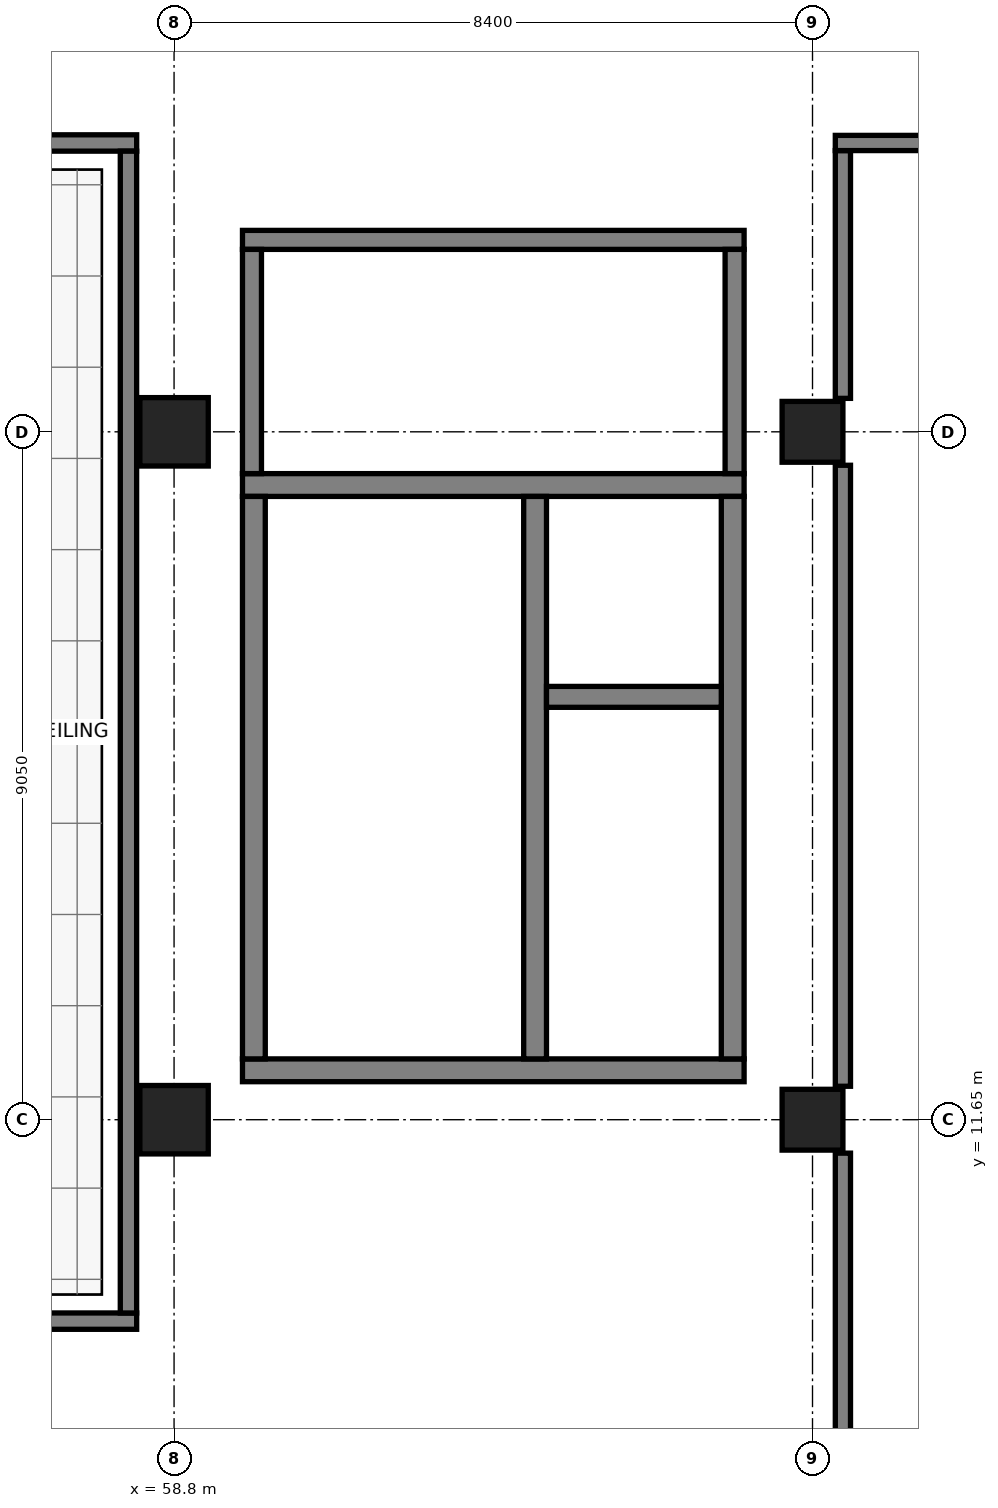
"""IFC4 building model, lengths in metres.
Left out: names, types, materials, properties, quantities, classifications, styles, units other than length and angle.
Written with IfcOpenShell. Run it as: python <this file> out.ifc"""

import sys

from ifc_helpers import new_model, si_unit, direction, frame, frame_2d, origin, origin_2d, place, context, subcontext, project, spatial, rectangle, extrude, element, fill, save


model = new_model("IFC4")
c1 = context("Model", 3, precision=1e-05, world=origin(), true_north=direction((0.0, 1.0)))
c2 = subcontext(c1, "Body", "Model", "MODEL_VIEW")
j1 = project(units=[si_unit("LENGTHUNIT", "METRE"), si_unit("PLANEANGLEUNIT", "RADIAN")], contexts=[c1])
p1 = place(None, origin())
s1 = spatial("IfcSite", under=j1, at=p1, CompositionType="ELEMENT")
p2 = place(p1, origin())
s2 = spatial("IfcBuilding", under=s1, at=p2, CompositionType="ELEMENT")
p3 = place(p2, origin())
s3 = spatial("IfcBuildingStorey", under=s2, at=p3, CompositionType="ELEMENT", Elevation=0.0)
for number, where, z_axis, x_axis in (
    (1, (58.8, 11.65, 0.0), (0.0, 0.0, 1.0), (1.0, 0.0, 0.0)),
    (2, (58.8, 20.7, 0.0), (0.0, 0.0, 1.0), (1.0, 0.0, 0.0)),
):
    element("IfcColumn", number, at=place(p3, frame(where, z_axis=z_axis, x_axis=x_axis)), inside=s3, PredefinedType="COLUMN", context=c2, shape_type="SweptSolid", body=[
        extrude(rectangle(XDim=0.9, YDim=0.9, at=origin_2d()), origin(), (0.0, 0.0, 1.0), 5.4),
    ])
for number, where, z_axis, x_axis in (
    (3, (67.2, 11.65, 0.0), (0.0, 0.0, 1.0), (1.0, 0.0, 0.0)),
    (4, (67.2, 20.7, 0.0), (0.0, 0.0, 1.0), (1.0, 0.0, 0.0)),
):
    element("IfcColumn", number, at=place(p3, frame(where, z_axis=z_axis, x_axis=x_axis)), inside=s3, PredefinedType="COLUMN", context=c2, shape_type="SweptSolid", body=[
        extrude(rectangle(XDim=0.8, YDim=0.8, at=origin_2d()), origin(), (0.0, 0.0, 1.0), 5.4),
    ])
p4 = place(p3, frame((59.7, 12.3, 0.0), z_axis=(0.0, 0.0, 1.0), x_axis=(1.0, 0.0, 0.0)))
e5 = element("IfcWall", 5, at=p4, inside=s3, PredefinedType="SHEAR", context=c2, shape_type="SweptSolid", body=[
    extrude(rectangle(XDim=6.6, YDim=0.3, at=frame_2d((3.3, 0.0))), origin(), (0.0, 0.0, 1.0), 5.09),
])
p5 = place(p3, frame((59.7, 20.0, 0.0), z_axis=(0.0, 0.0, 1.0), x_axis=(1.0, 0.0, 0.0)))
e6 = element("IfcWall", 6, at=p5, inside=s3, PredefinedType="SHEAR", context=c2, shape_type="SweptSolid", body=[
    extrude(rectangle(XDim=6.6, YDim=0.3, at=frame_2d((3.3, 0.0))), origin(), (0.0, 0.0, 1.0), 5.09),
])
p6 = place(p5, frame((1.425, 0.0, 0.0)))
e7 = element("IfcOpeningElement", 7, at=p6, cuts=e6, PredefinedType="OPENING", context=c2, shape_type="SweptSolid", body=[
    extrude(rectangle(XDim=1.15, YDim=2.2, at=frame_2d((0.575, 1.1))), frame((0.0, 0.16, 0.0), z_axis=(0.0, -1.0, 0.0), x_axis=(1.0, 0.0, 0.0)), (0.0, 0.0, 1.0), 0.32),
])
p7 = place(p5, frame((4.5, 0.0, 0.0)))
e8 = element("IfcOpeningElement", 8, at=p7, cuts=e6, PredefinedType="OPENING", context=c2, shape_type="SweptSolid", body=[
    extrude(rectangle(XDim=1.3, YDim=2.2, at=frame_2d((0.65, 1.1))), frame((0.0, 0.16, 0.0), z_axis=(0.0, -1.0, 0.0), x_axis=(1.0, 0.0, 0.0)), (0.0, 0.0, 1.0), 0.32),
])
for number, where, z_axis, x_axis in (
    (9, (59.85, 12.45, 0.0), (0.0, 0.0, 1.0), (0.0, 1.0, 0.0)),
    (10, (66.15, 12.45, 0.0), (0.0, 0.0, 1.0), (0.0, 1.0, 0.0)),
    (11, (63.55, 12.45, 0.0), (0.0, 0.0, 1.0), (0.0, 1.0, 0.0)),
):
    element("IfcWall", number, at=place(p3, frame(where, z_axis=z_axis, x_axis=x_axis)), inside=s3, PredefinedType="SHEAR", context=c2, shape_type="SweptSolid", body=[
        extrude(rectangle(XDim=7.4, YDim=0.3, at=frame_2d((3.7, 0.0))), origin(), (0.0, 0.0, 1.0), 5.09),
    ])
p8 = place(p3, frame((63.7, 17.213, 0.0), z_axis=(0.0, 0.0, 1.0), x_axis=(1.0, 0.0, 0.0)))
e12 = element("IfcWall", 12, at=p8, inside=s3, PredefinedType="SHEAR", context=c2, shape_type="SweptSolid", body=[
    extrude(rectangle(XDim=2.3, YDim=0.275, at=frame_2d((1.15, 0.0))), origin(), (0.0, 0.0, 1.0), 5.09),
])
p9 = place(p3, frame((59.7, 23.225, 0.0), z_axis=(0.0, 0.0, 1.0), x_axis=(1.0, 0.0, 0.0)))
e13 = element("IfcWall", 13, at=p9, inside=s3, PredefinedType="PARTITIONING", context=c2, shape_type="SweptSolid", body=[
    extrude(rectangle(XDim=6.6, YDim=0.25, at=frame_2d((3.3, 0.0))), origin(), (0.0, 0.0, 1.0), 5.09),
])
p10 = place(p9, frame((2.4, 0.0, 0.0)))
e14 = element("IfcOpeningElement", 14, at=p10, cuts=e13, PredefinedType="OPENING", context=c2, shape_type="SweptSolid", body=[
    extrude(rectangle(XDim=1.8, YDim=2.25, at=frame_2d((0.9, 1.125))), frame((0.0, 0.135, 0.0), z_axis=(0.0, -1.0, 0.0), x_axis=(1.0, 0.0, 0.0)), (0.0, 0.0, 1.0), 0.27),
])
for number, where, z_axis, x_axis in (
    (15, (59.825, 20.15, 0.0), (0.0, 0.0, 1.0), (0.0, 1.0, 0.0)),
    (16, (66.175, 20.15, 0.0), (0.0, 0.0, 1.0), (0.0, 1.0, 0.0)),
):
    element("IfcWall", number, at=place(p3, frame(where, z_axis=z_axis, x_axis=x_axis)), inside=s3, PredefinedType="PARTITIONING", context=c2, shape_type="SweptSolid", body=[
        extrude(rectangle(XDim=2.95, YDim=0.25, at=frame_2d((1.475, 0.0))), origin(), (0.0, 0.0, 1.0), 4.23),
    ])
p11 = place(p3, frame((67.6, 2.9, 0.0), z_axis=(0.0, 0.0, 1.0), x_axis=(0.0, 1.0, 0.0)))
e17 = element("IfcWall", 17, at=p11, inside=s3, PredefinedType="PARTITIONING", context=c2, shape_type="SweptSolid", body=[
    extrude(rectangle(XDim=8.31, YDim=0.2, at=frame_2d((4.155, 0.0))), origin(), (0.0, 0.0, 1.0), 3.65),
])
p12 = place(p11, frame((3.265, 0.0, 0.0)))
e18 = element("IfcOpeningElement", 18, at=p12, cuts=e17, PredefinedType="OPENING", context=c2, shape_type="SweptSolid", body=[
    extrude(rectangle(XDim=1.78, YDim=2.38, at=frame_2d((0.89, 1.19))), frame((0.0, 0.11, 0.0), z_axis=(0.0, -1.0, 0.0), x_axis=(1.0, 0.0, 0.0)), (0.0, 0.0, 1.0), 0.22),
])
p13 = place(p3, frame((67.6, 12.09, 0.0), z_axis=(0.0, 0.0, 1.0), x_axis=(0.0, 1.0, 0.0)))
e19 = element("IfcWall", 19, at=p13, inside=s3, PredefinedType="PARTITIONING", context=c2, shape_type="SweptSolid", body=[
    extrude(rectangle(XDim=8.17, YDim=0.2, at=frame_2d((4.085, 0.0))), origin(), (0.0, 0.0, 1.0), 5.09),
])
p14 = place(p3, frame((67.6, 21.14, 0.0), z_axis=(0.0, 0.0, 1.0), x_axis=(0.0, 1.0, 0.0)))
e20 = element("IfcWall", 20, at=p14, inside=s3, PredefinedType="PARTITIONING", context=c2, shape_type="SweptSolid", body=[
    extrude(rectangle(XDim=3.26, YDim=0.2, at=frame_2d((1.63, 0.0))), origin(), (0.0, 0.0, 1.0), 4.54),
])
p15 = place(p3, frame((67.5, 24.5, 0.0), z_axis=(0.0, 0.0, 1.0), x_axis=(1.0, 0.0, 0.0)))
e21 = element("IfcWall", 21, at=p15, inside=s3, PredefinedType="PARTITIONING", context=c2, shape_type="SweptSolid", body=[
    extrude(rectangle(XDim=24.6, YDim=0.2, at=frame_2d((12.3, 0.0))), origin(), (0.0, 0.0, 1.0), 4.13),
])
p16 = place(p15, frame((11.8, 0.0, 0.0)))
e22 = element("IfcOpeningElement", 22, at=p16, cuts=e21, PredefinedType="OPENING", context=c2, shape_type="SweptSolid", body=[
    extrude(rectangle(XDim=1.0, YDim=2.15, at=frame_2d((0.5, 1.075))), frame((0.0, 0.11, 0.0), z_axis=(0.0, -1.0, 0.0), x_axis=(1.0, 0.0, 0.0)), (0.0, 0.0, 1.0), 0.22),
])
p17 = place(p3, frame((42.292, 9.0, 0.0), z_axis=(0.0, 0.0, 1.0), x_axis=(1.0, 0.0, 0.0)))
e23 = element("IfcWall", 23, at=p17, inside=s3, PredefinedType="PARTITIONING", context=c2, shape_type="SweptSolid", body=[
    extrude(rectangle(XDim=16.016, YDim=0.215, at=frame_2d((8.008, 0.0))), origin(), (0.0, 0.0, 1.0), 4.14),
])
p18 = place(p17, frame((7.548, 0.0, 0.0)))
e24 = element("IfcOpeningElement", 24, at=p18, cuts=e23, PredefinedType="OPENING", context=c2, shape_type="SweptSolid", body=[
    extrude(rectangle(XDim=0.92, YDim=2.1, at=frame_2d((0.46, 1.05))), frame((0.0, 0.118, 0.0), z_axis=(0.0, -1.0, 0.0), x_axis=(1.0, 0.0, 0.0)), (0.0, 0.0, 1.0), 0.235),
])
p19 = place(p17, frame((9.068, 0.0, 1.05)))
e25 = element("IfcOpeningElement", 25, at=p19, cuts=e23, PredefinedType="OPENING", context=c2, shape_type="SweptSolid", body=[
    extrude(rectangle(XDim=2.1, YDim=1.3, at=frame_2d((1.05, 0.65))), frame((0.0, 0.118, 0.0), z_axis=(0.0, -1.0, 0.0), x_axis=(1.0, 0.0, 0.0)), (0.0, 0.0, 1.0), 0.235),
])
p20 = place(p3, frame((42.292, 24.5, 0.0), z_axis=(0.0, 0.0, 1.0), x_axis=(1.0, 0.0, 0.0)))
e26 = element("IfcWall", 26, at=p20, inside=s3, PredefinedType="PARTITIONING", context=c2, shape_type="SweptSolid", body=[
    extrude(rectangle(XDim=16.016, YDim=0.215, at=frame_2d((8.008, 0.0))), origin(), (0.0, 0.0, 1.0), 4.13),
])
p21 = place(p3, frame((58.2, 9.107, 0.0), z_axis=(0.0, 0.0, 1.0), x_axis=(0.0, 1.0, 0.0)))
e27 = element("IfcWall", 27, at=p21, inside=s3, PredefinedType="PARTITIONING", context=c2, shape_type="SweptSolid", body=[
    extrude(rectangle(XDim=15.285, YDim=0.215, at=frame_2d((7.643, 0.0))), origin(), (0.0, 0.0, 1.0), 4.23),
])
p22 = place(p6, origin())
e28 = element("IfcDoor", 28, at=p22, inside=s3, OperationType="SINGLE_SWING_RIGHT", PredefinedType="DOOR", context=c2, shape_type="SweptSolid", body=[
    extrude(rectangle(XDim=1.15, YDim=2.2, at=frame_2d((0.575, 1.1))), frame((0.0, 0.025, 0.0), z_axis=(0.0, -1.0, 0.0), x_axis=(1.0, 0.0, 0.0)), (0.0, 0.0, 1.0), 0.05),
])
fill(e7, e28)
p23 = place(p7, origin())
e29 = element("IfcDoor", 29, at=p23, inside=s3, OperationType="DOUBLE_DOOR_SLIDING", PredefinedType="DOOR", context=c2, shape_type="SweptSolid", body=[
    extrude(rectangle(XDim=1.3, YDim=2.2, at=frame_2d((0.65, 1.1))), frame((0.0, 0.025, 0.0), z_axis=(0.0, -1.0, 0.0), x_axis=(1.0, 0.0, 0.0)), (0.0, 0.0, 1.0), 0.05),
])
fill(e8, e29)
p24 = place(p10, origin())
e30 = element("IfcDoor", 30, at=p24, inside=s3, OperationType="DOUBLE_DOOR_SINGLE_SWING", PredefinedType="DOOR", context=c2, shape_type="SweptSolid", body=[
    extrude(rectangle(XDim=1.8, YDim=2.25, at=frame_2d((0.9, 1.125))), frame((0.0, 0.025, 0.0), z_axis=(0.0, -1.0, 0.0), x_axis=(1.0, 0.0, 0.0)), (0.0, 0.0, 1.0), 0.05),
])
fill(e14, e30)
p25 = place(p12, frame((1.78, 0.0, 0.0), z_axis=(0.0, 0.0, 1.0), x_axis=(-1.0, 0.0, 0.0)))
e31 = element("IfcDoor", 31, at=p25, inside=s3, OperationType="DOUBLE_DOOR_SINGLE_SWING", PredefinedType="DOOR", context=c2, shape_type="SweptSolid", body=[
    extrude(rectangle(XDim=1.78, YDim=2.38, at=frame_2d((0.89, 1.19))), frame((0.0, 0.025, 0.0), z_axis=(0.0, -1.0, 0.0), x_axis=(1.0, 0.0, 0.0)), (0.0, 0.0, 1.0), 0.05),
])
fill(e18, e31)
save(model, sys.argv[1])
